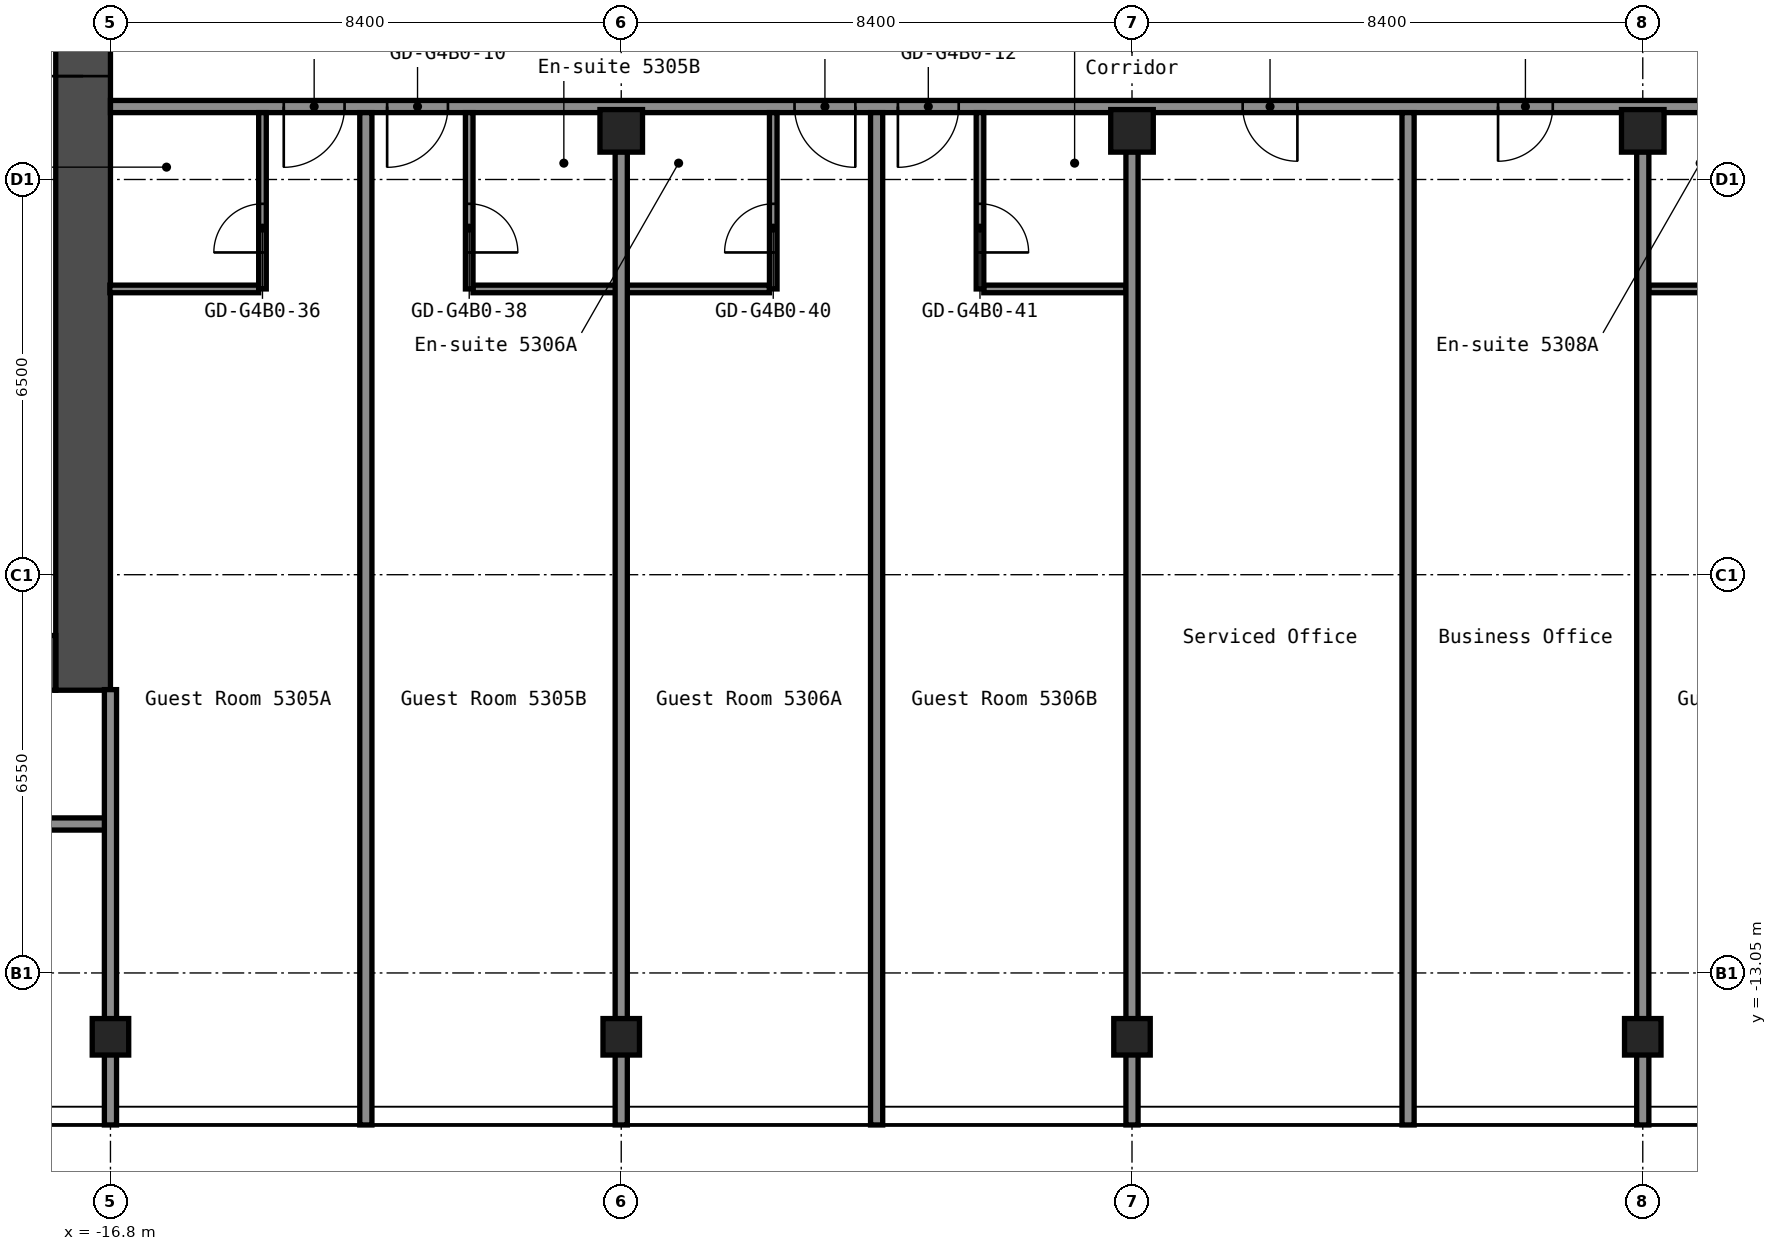
"""IFC4 building model, lengths in metres.
Left out: names, types, materials, properties, quantities, classifications, styles, units other than length and angle.
Written with IfcOpenShell. Run it as: python <this file> out.ifc"""

import sys

from ifc_helpers import new_model, si_unit, direction, frame, frame_2d, origin, origin_2d, place, context, subcontext, project, spatial, rectangle, hollow_rectangle, extrude, element, fill, save


model = new_model("IFC4")
c1 = context("Model", 3, precision=1e-05, world=origin(), true_north=direction((0.0, 1.0)))
c2 = subcontext(c1, "Body", "Model", "MODEL_VIEW")
j1 = project(units=[si_unit("LENGTHUNIT", "METRE"), si_unit("PLANEANGLEUNIT", "RADIAN")], contexts=[c1])
p1 = place(None, origin())
s1 = spatial("IfcSite", under=j1, at=p1, CompositionType="ELEMENT")
p2 = place(p1, origin())
s2 = spatial("IfcBuilding", under=s1, at=p2, CompositionType="ELEMENT")
p3 = place(p2, frame((0.0, 0.0, 189.8)))
s3 = spatial("IfcBuildingStorey", under=s2, at=p3, CompositionType="ELEMENT", Elevation=189.8)
for number, where, z_axis, x_axis in (
    (1, (-16.8, -14.1, 0.0), (0.0, 0.0, 1.0), (1.0, 0.0, 0.0)),
    (2, (-8.4, -14.1, 0.0), (0.0, 0.0, 1.0), (1.0, 0.0, 0.0)),
):
    element("IfcColumn", number, at=place(p3, frame(where, z_axis=z_axis, x_axis=x_axis)), inside=s3, PredefinedType="COLUMN", context=c2, shape_type="SweptSolid", body=[
        extrude(hollow_rectangle(XDim=0.6, YDim=0.6, WallThickness=0.025, InnerFilletRadius=0.038, OuterFilletRadius=0.062, at=origin_2d()), origin(), (0.0, 0.0, 1.0), 2.75),
    ])
p4 = place(p3, frame((-8.4, 0.8, 0.0), z_axis=(0.0, 0.0, 1.0), x_axis=(1.0, 0.0, 0.0)))
e3 = element("IfcColumn", 3, at=p4, inside=s3, PredefinedType="COLUMN", context=c2, shape_type="SweptSolid", body=[
    extrude(hollow_rectangle(XDim=0.7, YDim=0.7, WallThickness=0.028, at=origin_2d()), origin(), (0.0, 0.0, 1.0), 2.75),
])
p5 = place(p3, frame((0.0, -14.1, 0.0), z_axis=(0.0, 0.0, 1.0), x_axis=(1.0, 0.0, 0.0)))
e4 = element("IfcColumn", 4, at=p5, inside=s3, PredefinedType="COLUMN", context=c2, shape_type="SweptSolid", body=[
    extrude(hollow_rectangle(XDim=0.6, YDim=0.6, WallThickness=0.025, InnerFilletRadius=0.038, OuterFilletRadius=0.062, at=origin_2d()), origin(), (0.0, 0.0, 1.0), 2.75),
])
p6 = place(p3, frame((0.0, 0.8, 0.0), z_axis=(0.0, 0.0, 1.0), x_axis=(1.0, 0.0, 0.0)))
e5 = element("IfcColumn", 5, at=p6, inside=s3, PredefinedType="COLUMN", context=c2, shape_type="SweptSolid", body=[
    extrude(hollow_rectangle(XDim=0.7, YDim=0.7, WallThickness=0.028, at=origin_2d()), origin(), (0.0, 0.0, 1.0), 2.75),
])
p7 = place(p3, frame((8.4, -14.1, 0.0), z_axis=(0.0, 0.0, 1.0), x_axis=(1.0, 0.0, 0.0)))
e6 = element("IfcColumn", 6, at=p7, inside=s3, PredefinedType="COLUMN", context=c2, shape_type="SweptSolid", body=[
    extrude(hollow_rectangle(XDim=0.6, YDim=0.6, WallThickness=0.025, InnerFilletRadius=0.038, OuterFilletRadius=0.062, at=origin_2d()), origin(), (0.0, 0.0, 1.0), 2.75),
])
p8 = place(p3, frame((8.4, 0.8, 0.0), z_axis=(0.0, 0.0, 1.0), x_axis=(1.0, 0.0, 0.0)))
e7 = element("IfcColumn", 7, at=p8, inside=s3, PredefinedType="COLUMN", context=c2, shape_type="SweptSolid", body=[
    extrude(hollow_rectangle(XDim=0.7, YDim=0.7, WallThickness=0.028, at=origin_2d()), origin(), (0.0, 0.0, 1.0), 2.75),
])
p9 = place(p3, frame((-17.25, -8.4, 0.0), z_axis=(0.0, 0.0, 1.0), x_axis=(0.0, 1.0, 0.0)))
e8 = element("IfcWall", 8, at=p9, inside=s3, PredefinedType="SHEAR", context=c2, shape_type="SweptSolid", body=[
    extrude(rectangle(XDim=16.8, YDim=0.9, at=frame_2d((8.4, 0.0))), origin(), (0.0, 0.0, 1.0), 2.75),
])
p10 = place(p9, frame((10.1, 0.0, 0.0)))
e9 = element("IfcOpeningElement", 9, at=p10, cuts=e8, PredefinedType="OPENING", context=c2, shape_type="SweptSolid", body=[
    extrude(rectangle(XDim=1.6, YDim=2.1, at=frame_2d((0.8, 1.05))), frame((0.0, 0.46, 0.0), z_axis=(0.0, -1.0, 0.0), x_axis=(1.0, 0.0, 0.0)), (0.0, 0.0, 1.0), 0.92),
])
p11 = place(p3, frame((-32.7, -7.95, 0.0), z_axis=(0.0, 0.0, 1.0), x_axis=(1.0, 0.0, 0.0)))
e10 = element("IfcWall", 10, at=p11, inside=s3, PredefinedType="SHEAR", context=c2, shape_type="SweptSolid", body=[
    extrude(rectangle(XDim=15.0, YDim=0.9, at=frame_2d((7.5, 0.0))), origin(), (0.0, 0.0, 1.0), 2.75),
])
p12 = place(p11, frame((11.45, 0.0, 0.0)))
e11 = element("IfcOpeningElement", 11, at=p12, cuts=e10, PredefinedType="OPENING", context=c2, shape_type="SweptSolid", body=[
    extrude(rectangle(XDim=1.0, YDim=2.1, at=frame_2d((0.5, 1.05))), frame((0.0, 0.46, 0.0), z_axis=(0.0, -1.0, 0.0), x_axis=(1.0, 0.0, 0.0)), (0.0, 0.0, 1.0), 0.92),
])
p13 = place(p3, frame((-38.1, -10.6, 0.0), z_axis=(0.0, 0.0, 1.0), x_axis=(1.0, 0.0, 0.0)))
e12 = element("IfcWall", 12, at=p13, inside=s3, PredefinedType="PARTITIONING", context=c2, shape_type="SweptSolid", body=[
    extrude(rectangle(XDim=21.3, YDim=0.2, at=frame_2d((10.65, 0.0))), origin(), (0.0, 0.0, 1.0), 2.75),
])
p14 = place(p13, frame((1.95, 0.0, 0.0)))
e13 = element("IfcOpeningElement", 13, at=p14, cuts=e12, PredefinedType="OPENING", context=c2, shape_type="SweptSolid", body=[
    extrude(rectangle(XDim=0.9, YDim=2.1, at=frame_2d((0.45, 1.05))), frame((0.0, 0.11, 0.0), z_axis=(0.0, -1.0, 0.0), x_axis=(1.0, 0.0, 0.0)), (0.0, 0.0, 1.0), 0.22),
])
p15 = place(p13, frame((5.645, 0.0, 0.0)))
e14 = element("IfcOpeningElement", 14, at=p15, cuts=e12, PredefinedType="OPENING", context=c2, shape_type="SweptSolid", body=[
    extrude(rectangle(XDim=0.9, YDim=2.1, at=frame_2d((0.45, 1.05))), frame((0.0, 0.11, 0.0), z_axis=(0.0, -1.0, 0.0), x_axis=(1.0, 0.0, 0.0)), (0.0, 0.0, 1.0), 0.22),
])
p16 = place(p13, frame((9.845, 0.0, 0.0)))
e15 = element("IfcOpeningElement", 15, at=p16, cuts=e12, PredefinedType="OPENING", context=c2, shape_type="SweptSolid", body=[
    extrude(rectangle(XDim=0.9, YDim=2.1, at=frame_2d((0.45, 1.05))), frame((0.0, 0.11, 0.0), z_axis=(0.0, -1.0, 0.0), x_axis=(1.0, 0.0, 0.0)), (0.0, 0.0, 1.0), 0.22),
])
p17 = place(p13, frame((16.6, 0.0, 0.0)))
e16 = element("IfcOpeningElement", 16, at=p17, cuts=e12, PredefinedType="OPENING", context=c2, shape_type="SweptSolid", body=[
    extrude(rectangle(XDim=1.0, YDim=2.1, at=frame_2d((0.5, 1.05))), frame((0.0, 0.11, 0.0), z_axis=(0.0, -1.0, 0.0), x_axis=(1.0, 0.0, 0.0)), (0.0, 0.0, 1.0), 0.22),
])
p18 = place(p3, frame((-16.81, -1.8, 0.0), z_axis=(0.0, 0.0, 1.0), x_axis=(1.0, 0.0, 0.0)))
e17 = element("IfcWall", 17, at=p18, inside=s3, PredefinedType="PARTITIONING", context=c2, shape_type="SweptSolid", body=[
    extrude(rectangle(XDim=2.448, YDim=0.125, at=frame_2d((1.224, 0.0))), origin(), (0.0, 0.0, 1.0), 2.75),
])
p19 = place(p3, frame((-10.837, -1.8, 0.0), z_axis=(0.0, 0.0, 1.0), x_axis=(1.0, 0.0, 0.0)))
e18 = element("IfcWall", 18, at=p19, inside=s3, PredefinedType="PARTITIONING", context=c2, shape_type="SweptSolid", body=[
    extrude(rectangle(XDim=4.875, YDim=0.125, at=frame_2d((2.438, 0.0))), origin(), (0.0, 0.0, 1.0), 2.75),
])
for number, where, z_axis, x_axis in (
    (19, (-2.438, -1.8, 0.0), (0.0, 0.0, 1.0), (1.0, 0.0, 0.0)),
    (20, (8.5, -1.8, 0.0), (0.0, 0.0, 1.0), (1.0, 0.0, 0.0)),
):
    element("IfcWall", number, at=place(p3, frame(where, z_axis=z_axis, x_axis=x_axis)), inside=s3, PredefinedType="PARTITIONING", context=c2, shape_type="SweptSolid", body=[
        extrude(rectangle(XDim=2.337, YDim=0.125, at=frame_2d((1.169, 0.0))), origin(), (0.0, 0.0, 1.0), 2.75),
    ])
p20 = place(p3, frame((-16.8, 1.2, 0.0), z_axis=(0.0, 0.0, 1.0), x_axis=(1.0, 0.0, 0.0)))
e21 = element("IfcWall", 21, at=p20, inside=s3, PredefinedType="PARTITIONING", context=c2, shape_type="SweptSolid", body=[
    extrude(rectangle(XDim=33.6, YDim=0.2, at=frame_2d((16.8, 0.0))), origin(), (0.0, 0.0, 1.0), 2.75),
])
p21 = place(p20, frame((2.85, 0.0, 0.0)))
e22 = element("IfcOpeningElement", 22, at=p21, cuts=e21, PredefinedType="OPENING", context=c2, shape_type="SweptSolid", body=[
    extrude(rectangle(XDim=1.0, YDim=2.1, at=frame_2d((0.5, 1.05))), frame((0.0, 0.11, 0.0), z_axis=(0.0, -1.0, 0.0), x_axis=(1.0, 0.0, 0.0)), (0.0, 0.0, 1.0), 0.22),
])
p22 = place(p20, frame((4.55, 0.0, 0.0)))
e23 = element("IfcOpeningElement", 23, at=p22, cuts=e21, PredefinedType="OPENING", context=c2, shape_type="SweptSolid", body=[
    extrude(rectangle(XDim=1.0, YDim=2.1, at=frame_2d((0.5, 1.05))), frame((0.0, 0.11, 0.0), z_axis=(0.0, -1.0, 0.0), x_axis=(1.0, 0.0, 0.0)), (0.0, 0.0, 1.0), 0.22),
])
p23 = place(p20, frame((11.25, 0.0, 0.0)))
e24 = element("IfcOpeningElement", 24, at=p23, cuts=e21, PredefinedType="OPENING", context=c2, shape_type="SweptSolid", body=[
    extrude(rectangle(XDim=1.0, YDim=2.1, at=frame_2d((0.5, 1.05))), frame((0.0, 0.11, 0.0), z_axis=(0.0, -1.0, 0.0), x_axis=(1.0, 0.0, 0.0)), (0.0, 0.0, 1.0), 0.22),
])
p24 = place(p20, frame((12.95, 0.0, 0.0)))
e25 = element("IfcOpeningElement", 25, at=p24, cuts=e21, PredefinedType="OPENING", context=c2, shape_type="SweptSolid", body=[
    extrude(rectangle(XDim=1.0, YDim=2.1, at=frame_2d((0.5, 1.05))), frame((0.0, 0.11, 0.0), z_axis=(0.0, -1.0, 0.0), x_axis=(1.0, 0.0, 0.0)), (0.0, 0.0, 1.0), 0.22),
])
p25 = place(p20, frame((18.62, 0.0, 0.0)))
e26 = element("IfcOpeningElement", 26, at=p25, cuts=e21, PredefinedType="OPENING", context=c2, shape_type="SweptSolid", body=[
    extrude(rectangle(XDim=0.9, YDim=2.1, at=frame_2d((0.45, 1.05))), frame((0.0, 0.11, 0.0), z_axis=(0.0, -1.0, 0.0), x_axis=(1.0, 0.0, 0.0)), (0.0, 0.0, 1.0), 0.22),
])
p26 = place(p20, frame((22.82, 0.0, 0.0)))
e27 = element("IfcOpeningElement", 27, at=p26, cuts=e21, PredefinedType="OPENING", context=c2, shape_type="SweptSolid", body=[
    extrude(rectangle(XDim=0.9, YDim=2.1, at=frame_2d((0.45, 1.05))), frame((0.0, 0.11, 0.0), z_axis=(0.0, -1.0, 0.0), x_axis=(1.0, 0.0, 0.0)), (0.0, 0.0, 1.0), 0.22),
])
p27 = place(p20, frame((28.05, 0.0, 0.0)))
e28 = element("IfcOpeningElement", 28, at=p27, cuts=e21, PredefinedType="OPENING", context=c2, shape_type="SweptSolid", body=[
    extrude(rectangle(XDim=1.0, YDim=2.1, at=frame_2d((0.5, 1.05))), frame((0.0, 0.11, 0.0), z_axis=(0.0, -1.0, 0.0), x_axis=(1.0, 0.0, 0.0)), (0.0, 0.0, 1.0), 0.22),
])
p28 = place(p20, frame((29.75, 0.0, 0.0)))
e29 = element("IfcOpeningElement", 29, at=p28, cuts=e21, PredefinedType="OPENING", context=c2, shape_type="SweptSolid", body=[
    extrude(rectangle(XDim=1.0, YDim=2.1, at=frame_2d((0.5, 1.05))), frame((0.0, 0.11, 0.0), z_axis=(0.0, -1.0, 0.0), x_axis=(1.0, 0.0, 0.0)), (0.0, 0.0, 1.0), 0.22),
])
p29 = place(p3, frame((-16.8, -15.55, 0.0), z_axis=(0.0, 0.0, 1.0), x_axis=(0.0, 1.0, 0.0)))
e30 = element("IfcWall", 30, at=p29, inside=s3, PredefinedType="PARTITIONING", context=c2, shape_type="SweptSolid", body=[
    extrude(rectangle(XDim=7.16, YDim=0.2, at=frame_2d((3.58, 0.0))), origin(), (0.0, 0.0, 1.0), 2.75),
])
p30 = place(p3, frame((-14.3, -1.8, 0.0), z_axis=(0.0, 0.0, 1.0), x_axis=(0.0, 1.0, 0.0)))
e31 = element("IfcWall", 31, at=p30, inside=s3, PredefinedType="PARTITIONING", context=c2, shape_type="SweptSolid", body=[
    extrude(rectangle(XDim=2.9, YDim=0.125, at=frame_2d((1.45, 0.0))), origin(), (0.0, 0.0, 1.0), 2.75),
])
p31 = place(p30, frame((0.6, 0.0, 0.0)))
e32 = element("IfcOpeningElement", 32, at=p31, cuts=e31, PredefinedType="OPENING", context=c2, shape_type="SweptSolid", body=[
    extrude(rectangle(XDim=0.8, YDim=2.1, at=frame_2d((0.4, 1.05))), frame((0.0, 0.073, 0.0), z_axis=(0.0, -1.0, 0.0), x_axis=(1.0, 0.0, 0.0)), (0.0, 0.0, 1.0), 0.145),
])
p32 = place(p3, frame((-12.6, -15.55, 0.0), z_axis=(0.0, 0.0, 1.0), x_axis=(0.0, 1.0, 0.0)))
e33 = element("IfcWall", 33, at=p32, inside=s3, PredefinedType="PARTITIONING", context=c2, shape_type="SweptSolid", body=[
    extrude(rectangle(XDim=16.65, YDim=0.2, at=frame_2d((8.325, 0.0))), origin(), (0.0, 0.0, 1.0), 2.75),
])
p33 = place(p3, frame((-10.9, -1.8, 0.0), z_axis=(0.0, 0.0, 1.0), x_axis=(0.0, 1.0, 0.0)))
e34 = element("IfcWall", 34, at=p33, inside=s3, PredefinedType="PARTITIONING", context=c2, shape_type="SweptSolid", body=[
    extrude(rectangle(XDim=2.9, YDim=0.125, at=frame_2d((1.45, 0.0))), origin(), (0.0, 0.0, 1.0), 2.75),
])
p34 = place(p33, frame((0.6, 0.0, 0.0)))
e35 = element("IfcOpeningElement", 35, at=p34, cuts=e34, PredefinedType="OPENING", context=c2, shape_type="SweptSolid", body=[
    extrude(rectangle(XDim=0.8, YDim=2.1, at=frame_2d((0.4, 1.05))), frame((0.0, 0.073, 0.0), z_axis=(0.0, -1.0, 0.0), x_axis=(1.0, 0.0, 0.0)), (0.0, 0.0, 1.0), 0.145),
])
p35 = place(p3, frame((-8.4, -15.55, 0.0), z_axis=(0.0, 0.0, 1.0), x_axis=(0.0, 1.0, 0.0)))
e36 = element("IfcWall", 36, at=p35, inside=s3, PredefinedType="PARTITIONING", context=c2, shape_type="SweptSolid", body=[
    extrude(rectangle(XDim=16.01, YDim=0.2, at=frame_2d((8.005, 0.0))), origin(), (0.0, 0.0, 1.0), 2.75),
])
p36 = place(p3, frame((-5.9, -1.8, 0.0), z_axis=(0.0, 0.0, 1.0), x_axis=(0.0, 1.0, 0.0)))
e37 = element("IfcWall", 37, at=p36, inside=s3, PredefinedType="PARTITIONING", context=c2, shape_type="SweptSolid", body=[
    extrude(rectangle(XDim=2.9, YDim=0.125, at=frame_2d((1.45, 0.0))), origin(), (0.0, 0.0, 1.0), 2.75),
])
p37 = place(p36, frame((0.6, 0.0, 0.0)))
e38 = element("IfcOpeningElement", 38, at=p37, cuts=e37, PredefinedType="OPENING", context=c2, shape_type="SweptSolid", body=[
    extrude(rectangle(XDim=0.8, YDim=2.1, at=frame_2d((0.4, 1.05))), frame((0.0, 0.073, 0.0), z_axis=(0.0, -1.0, 0.0), x_axis=(1.0, 0.0, 0.0)), (0.0, 0.0, 1.0), 0.145),
])
p38 = place(p3, frame((-4.2, -15.55, 0.0), z_axis=(0.0, 0.0, 1.0), x_axis=(0.0, 1.0, 0.0)))
e39 = element("IfcWall", 39, at=p38, inside=s3, PredefinedType="PARTITIONING", context=c2, shape_type="SweptSolid", body=[
    extrude(rectangle(XDim=16.65, YDim=0.2, at=frame_2d((8.325, 0.0))), origin(), (0.0, 0.0, 1.0), 2.75),
])
p39 = place(p3, frame((-2.5, -1.8, 0.0), z_axis=(0.0, 0.0, 1.0), x_axis=(0.0, 1.0, 0.0)))
e40 = element("IfcWall", 40, at=p39, inside=s3, PredefinedType="PARTITIONING", context=c2, shape_type="SweptSolid", body=[
    extrude(rectangle(XDim=2.9, YDim=0.125, at=frame_2d((1.45, 0.0))), origin(), (0.0, 0.0, 1.0), 2.75),
])
p40 = place(p39, frame((0.6, 0.0, 0.0)))
e41 = element("IfcOpeningElement", 41, at=p40, cuts=e40, PredefinedType="OPENING", context=c2, shape_type="SweptSolid", body=[
    extrude(rectangle(XDim=0.8, YDim=2.1, at=frame_2d((0.4, 1.05))), frame((0.0, 0.073, 0.0), z_axis=(0.0, -1.0, 0.0), x_axis=(1.0, 0.0, 0.0)), (0.0, 0.0, 1.0), 0.145),
])
p41 = place(p3, frame((0.0, -15.55, 0.0), z_axis=(0.0, 0.0, 1.0), x_axis=(0.0, 1.0, 0.0)))
e42 = element("IfcWall", 42, at=p41, inside=s3, PredefinedType="PARTITIONING", context=c2, shape_type="SweptSolid", body=[
    extrude(rectangle(XDim=16.01, YDim=0.2, at=frame_2d((8.005, 0.0))), origin(), (0.0, 0.0, 1.0), 2.75),
])
p42 = place(p3, frame((4.54, -15.55, 0.0), z_axis=(0.0, 0.0, 1.0), x_axis=(0.0, 1.0, 0.0)))
e43 = element("IfcWall", 43, at=p42, inside=s3, PredefinedType="PARTITIONING", context=c2, shape_type="SweptSolid", body=[
    extrude(rectangle(XDim=16.65, YDim=0.2, at=frame_2d((8.325, 0.0))), origin(), (0.0, 0.0, 1.0), 2.75),
])
p43 = place(p3, frame((8.4, -15.55, 0.0), z_axis=(0.0, 0.0, 1.0), x_axis=(0.0, 1.0, 0.0)))
e44 = element("IfcWall", 44, at=p43, inside=s3, PredefinedType="PARTITIONING", context=c2, shape_type="SweptSolid", body=[
    extrude(rectangle(XDim=16.01, YDim=0.2, at=frame_2d((8.005, 0.0))), origin(), (0.0, 0.0, 1.0), 2.75),
])
p44 = place(p10, origin())
e45 = element("IfcDoor", 45, at=p44, inside=s3, OperationType="DOUBLE_DOOR_SINGLE_SWING", PredefinedType="DOOR", context=c2, shape_type="SweptSolid", body=[
    extrude(rectangle(XDim=1.6, YDim=2.1, at=frame_2d((0.8, 1.05))), frame((0.0, 0.025, 0.0), z_axis=(0.0, -1.0, 0.0), x_axis=(1.0, 0.0, 0.0)), (0.0, 0.0, 1.0), 0.05),
])
fill(e9, e45)
p45 = place(p21, origin())
e46 = element("IfcDoor", 46, at=p45, inside=s3, OperationType="SINGLE_SWING_LEFT", PredefinedType="DOOR", context=c2, shape_type="SweptSolid", body=[
    extrude(rectangle(XDim=1.0, YDim=2.1, at=frame_2d((0.5, 1.05))), frame((0.0, 0.025, 0.0), z_axis=(0.0, -1.0, 0.0), x_axis=(1.0, 0.0, 0.0)), (0.0, 0.0, 1.0), 0.05),
])
fill(e22, e46)
p46 = place(p22, origin())
e47 = element("IfcDoor", 47, at=p46, inside=s3, OperationType="SINGLE_SWING_LEFT", PredefinedType="DOOR", context=c2, shape_type="SweptSolid", body=[
    extrude(rectangle(XDim=1.0, YDim=2.1, at=frame_2d((0.5, 1.05))), frame((0.0, 0.025, 0.0), z_axis=(0.0, -1.0, 0.0), x_axis=(1.0, 0.0, 0.0)), (0.0, 0.0, 1.0), 0.05),
])
fill(e23, e47)
p47 = place(p23, origin())
e48 = element("IfcDoor", 48, at=p47, inside=s3, OperationType="SINGLE_SWING_RIGHT", PredefinedType="DOOR", context=c2, shape_type="SweptSolid", body=[
    extrude(rectangle(XDim=1.0, YDim=2.1, at=frame_2d((0.5, 1.05))), frame((0.0, 0.025, 0.0), z_axis=(0.0, -1.0, 0.0), x_axis=(1.0, 0.0, 0.0)), (0.0, 0.0, 1.0), 0.05),
])
fill(e24, e48)
p48 = place(p24, origin())
e49 = element("IfcDoor", 49, at=p48, inside=s3, OperationType="SINGLE_SWING_LEFT", PredefinedType="DOOR", context=c2, shape_type="SweptSolid", body=[
    extrude(rectangle(XDim=1.0, YDim=2.1, at=frame_2d((0.5, 1.05))), frame((0.0, 0.025, 0.0), z_axis=(0.0, -1.0, 0.0), x_axis=(1.0, 0.0, 0.0)), (0.0, 0.0, 1.0), 0.05),
])
fill(e25, e49)
p49 = place(p25, origin())
e50 = element("IfcDoor", 50, at=p49, inside=s3, OperationType="SINGLE_SWING_RIGHT", PredefinedType="DOOR", context=c2, shape_type="SweptSolid", body=[
    extrude(rectangle(XDim=0.9, YDim=2.1, at=frame_2d((0.45, 1.05))), frame((0.0, 0.025, 0.0), z_axis=(0.0, -1.0, 0.0), x_axis=(1.0, 0.0, 0.0)), (0.0, 0.0, 1.0), 0.05),
])
fill(e26, e50)
p50 = place(p26, origin())
e51 = element("IfcDoor", 51, at=p50, inside=s3, OperationType="SINGLE_SWING_LEFT", PredefinedType="DOOR", context=c2, shape_type="SweptSolid", body=[
    extrude(rectangle(XDim=0.9, YDim=2.1, at=frame_2d((0.45, 1.05))), frame((0.0, 0.025, 0.0), z_axis=(0.0, -1.0, 0.0), x_axis=(1.0, 0.0, 0.0)), (0.0, 0.0, 1.0), 0.05),
])
fill(e27, e51)
p51 = place(p31, origin())
e52 = element("IfcDoor", 52, at=p51, inside=s3, OperationType="SINGLE_SWING_RIGHT", PredefinedType="DOOR", context=c2, shape_type="SweptSolid", body=[
    extrude(rectangle(XDim=0.8, YDim=2.1, at=frame_2d((0.4, 1.05))), frame((0.0, 0.025, 0.0), z_axis=(0.0, -1.0, 0.0), x_axis=(1.0, 0.0, 0.0)), (0.0, 0.0, 1.0), 0.05),
])
fill(e32, e52)
p52 = place(p34, origin())
e53 = element("IfcDoor", 53, at=p52, inside=s3, OperationType="SINGLE_SWING_LEFT", PredefinedType="DOOR", context=c2, shape_type="SweptSolid", body=[
    extrude(rectangle(XDim=0.8, YDim=2.1, at=frame_2d((0.4, 1.05))), frame((0.0, 0.025, 0.0), z_axis=(0.0, -1.0, 0.0), x_axis=(1.0, 0.0, 0.0)), (0.0, 0.0, 1.0), 0.05),
])
fill(e35, e53)
p53 = place(p37, origin())
e54 = element("IfcDoor", 54, at=p53, inside=s3, OperationType="SINGLE_SWING_RIGHT", PredefinedType="DOOR", context=c2, shape_type="SweptSolid", body=[
    extrude(rectangle(XDim=0.8, YDim=2.1, at=frame_2d((0.4, 1.05))), frame((0.0, 0.025, 0.0), z_axis=(0.0, -1.0, 0.0), x_axis=(1.0, 0.0, 0.0)), (0.0, 0.0, 1.0), 0.05),
])
fill(e38, e54)
p54 = place(p40, origin())
e55 = element("IfcDoor", 55, at=p54, inside=s3, OperationType="SINGLE_SWING_LEFT", PredefinedType="DOOR", context=c2, shape_type="SweptSolid", body=[
    extrude(rectangle(XDim=0.8, YDim=2.1, at=frame_2d((0.4, 1.05))), frame((0.0, 0.025, 0.0), z_axis=(0.0, -1.0, 0.0), x_axis=(1.0, 0.0, 0.0)), (0.0, 0.0, 1.0), 0.05),
])
fill(e41, e55)
save(model, sys.argv[1])
